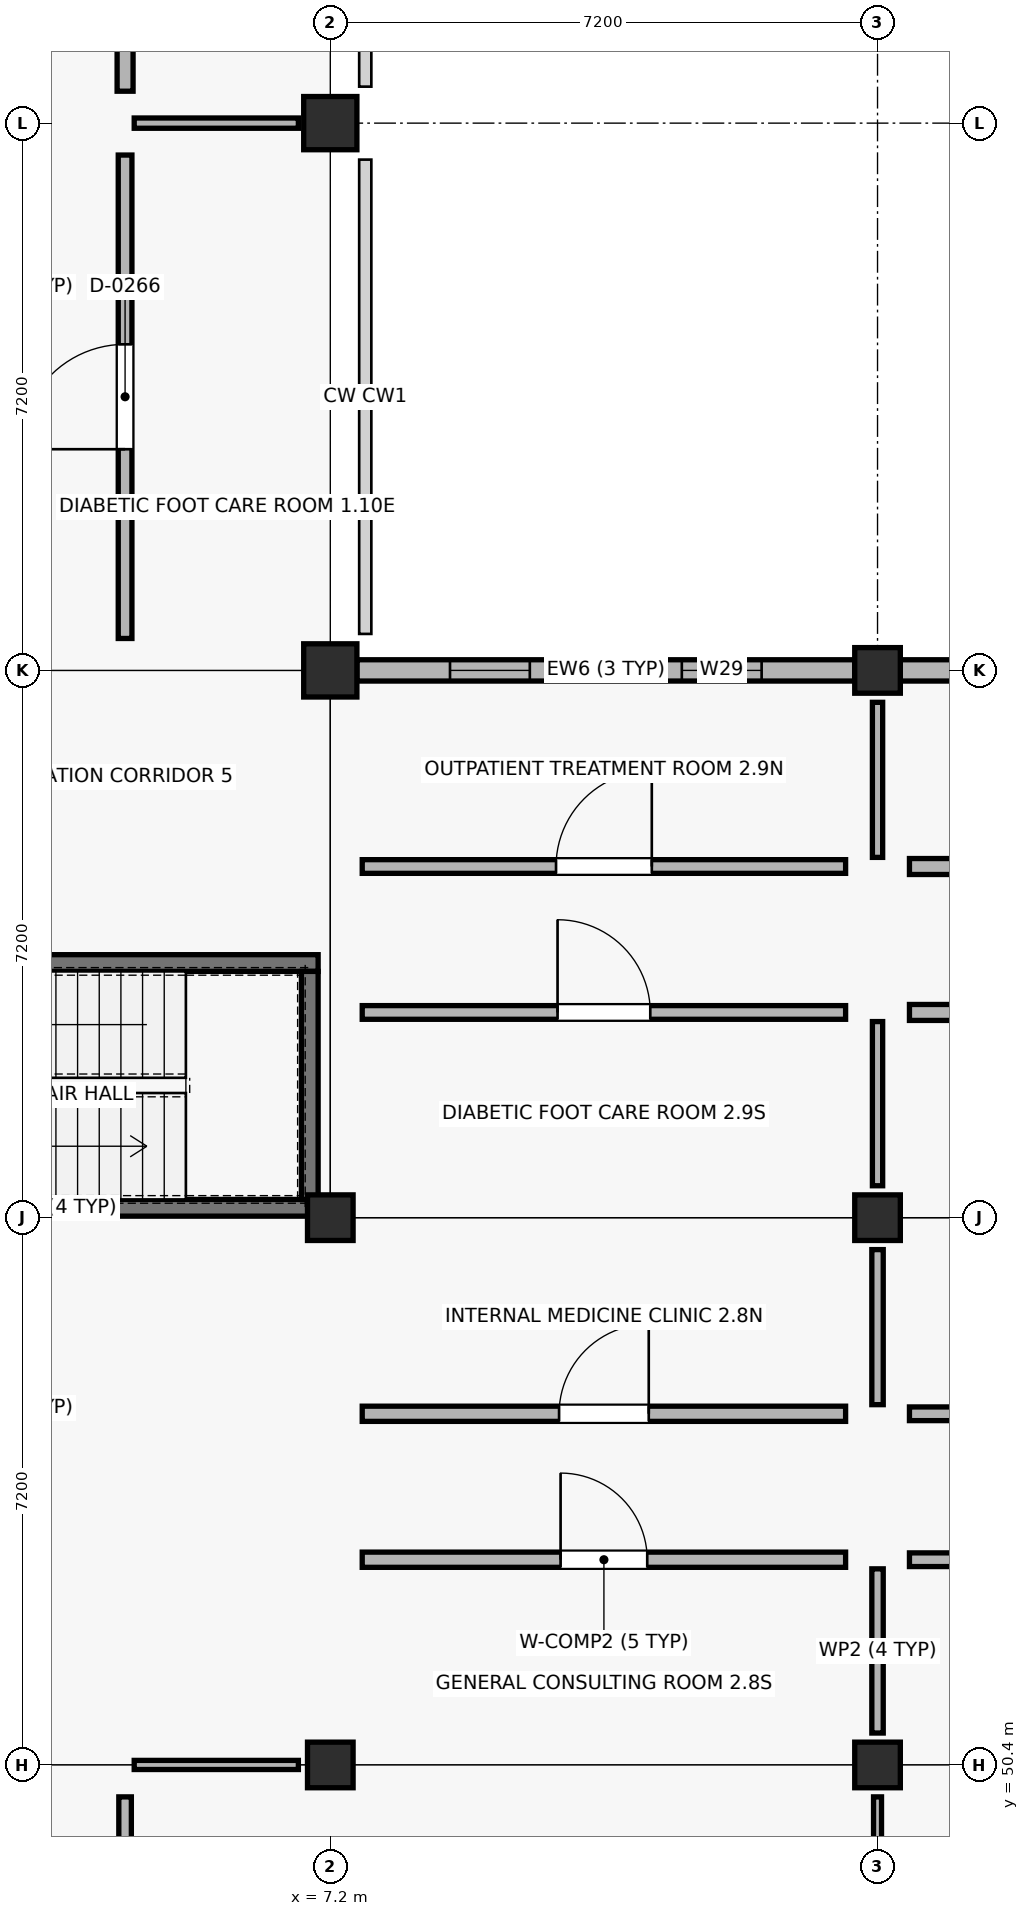
"""IFC4 building model, lengths in metres.
Left out: names, types, materials, properties, quantities, classifications, styles, units other than length and angle.
Written with IfcOpenShell. Run it as: python <this file> out.ifc"""

import sys

from ifc_helpers import new_model, si_unit, direction, frame, frame_2d, origin, origin_2d, place, context, subcontext, project, spatial, rectangle, extrude, element, fill, save


model = new_model("IFC4")
c1 = context("Model", 3, precision=1e-05, world=origin(), true_north=direction((0.0, 1.0)))
c2 = subcontext(c1, "Body", "Model", "MODEL_VIEW")
j1 = project(units=[si_unit("LENGTHUNIT", "METRE"), si_unit("PLANEANGLEUNIT", "RADIAN")], contexts=[c1])
p1 = place(None, origin())
s1 = spatial("IfcSite", under=j1, at=p1, CompositionType="ELEMENT")
p2 = place(p1, origin())
s2 = spatial("IfcBuilding", under=s1, at=p2, CompositionType="ELEMENT")
p3 = place(p2, frame((0.0, 0.0, 4.5)))
s3 = spatial("IfcBuildingStorey", under=s2, at=p3, CompositionType="ELEMENT", Elevation=4.5)
for number, where, z_axis, x_axis in (
    (1, (7.2, 50.4, 0.0), (0.0, 0.0, 1.0), (1.0, 0.0, 0.0)),
    (2, (7.2, 57.6, 0.0), (0.0, 0.0, 1.0), (1.0, 0.0, 0.0)),
):
    element("IfcColumn", number, at=place(p3, frame(where, z_axis=z_axis, x_axis=x_axis)), inside=s3, PredefinedType="COLUMN", context=c2, shape_type="SweptSolid", body=[
        extrude(rectangle(XDim=0.6, YDim=0.6, at=origin_2d()), origin(), (0.0, 0.0, 1.0), 4.5),
    ])
for number, where, z_axis, x_axis in (
    (3, (7.2, 64.8, 0.0), (0.0, 0.0, 1.0), (1.0, 0.0, 0.0)),
    (4, (7.2, 72.0, 0.0), (0.0, 0.0, 1.0), (1.0, 0.0, 0.0)),
):
    element("IfcColumn", number, at=place(p3, frame(where, z_axis=z_axis, x_axis=x_axis)), inside=s3, PredefinedType="COLUMN", context=c2, shape_type="SweptSolid", body=[
        extrude(rectangle(XDim=0.7, YDim=0.7, at=origin_2d()), origin(), (0.0, 0.0, 1.0), 4.5),
    ])
for number, where, z_axis, x_axis in (
    (5, (14.4, 50.4, 0.0), (0.0, 0.0, 1.0), (1.0, 0.0, 0.0)),
    (6, (14.4, 57.6, 0.0), (0.0, 0.0, 1.0), (1.0, 0.0, 0.0)),
    (7, (14.4, 64.8, 0.0), (0.0, 0.0, 1.0), (1.0, 0.0, 0.0)),
):
    element("IfcColumn", number, at=place(p3, frame(where, z_axis=z_axis, x_axis=x_axis)), inside=s3, PredefinedType="COLUMN", context=c2, shape_type="SweptSolid", body=[
        extrude(rectangle(XDim=0.6, YDim=0.6, at=origin_2d()), origin(), (0.0, 0.0, 1.0), 4.5),
    ])
p4 = place(p3, frame((14.1, 64.8, 0.0), z_axis=(0.0, 0.0, 1.0), x_axis=(-1.0, 0.0, 0.0)))
e8 = element("IfcWall", 8, at=p4, inside=s3, PredefinedType="STANDARD", context=c2, shape_type="SweptSolid", body=[
    extrude(rectangle(XDim=6.55, YDim=0.28, at=frame_2d((3.275, 0.0))), origin(), (0.0, 0.0, 1.0), 3.47),
])
p5 = place(p4, frame((1.225, 0.0, 0.9)))
e9 = element("IfcOpeningElement", 9, at=p5, cuts=e8, PredefinedType="OPENING", context=c2, shape_type="SweptSolid", body=[
    extrude(rectangle(XDim=1.05, YDim=1.62, at=frame_2d((0.525, 0.81))), frame((0.0, 0.15, 0.0), z_axis=(0.0, -1.0, 0.0), x_axis=(1.0, 0.0, 0.0)), (0.0, 0.0, 1.0), 0.3),
])
p6 = place(p4, frame((4.275, 0.0, 0.9)))
e10 = element("IfcOpeningElement", 10, at=p6, cuts=e8, PredefinedType="OPENING", context=c2, shape_type="SweptSolid", body=[
    extrude(rectangle(XDim=1.05, YDim=1.62, at=frame_2d((0.525, 0.81))), frame((0.0, 0.15, 0.0), z_axis=(0.0, -1.0, 0.0), x_axis=(1.0, 0.0, 0.0)), (0.0, 0.0, 1.0), 0.3),
])
p7 = place(p3, frame((21.275, 64.8, 0.0), z_axis=(0.0, 0.0, 1.0), x_axis=(-1.0, 0.0, 0.0)))
e11 = element("IfcWall", 11, at=p7, inside=s3, PredefinedType="STANDARD", context=c2, shape_type="SweptSolid", body=[
    extrude(rectangle(XDim=6.575, YDim=0.28, at=frame_2d((3.288, 0.0))), origin(), (0.0, 0.0, 1.0), 3.47),
])
p8 = place(p7, frame((1.075, 0.0, 0.9)))
e12 = element("IfcOpeningElement", 12, at=p8, cuts=e11, PredefinedType="OPENING", context=c2, shape_type="SweptSolid", body=[
    extrude(rectangle(XDim=1.35, YDim=1.75, at=frame_2d((0.675, 0.875))), frame((0.0, 0.15, 0.0), z_axis=(0.0, -1.0, 0.0), x_axis=(1.0, 0.0, 0.0)), (0.0, 0.0, 1.0), 0.3),
])
p9 = place(p7, frame((4.15, 0.0, 0.9)))
e13 = element("IfcOpeningElement", 13, at=p9, cuts=e11, PredefinedType="OPENING", context=c2, shape_type="SweptSolid", body=[
    extrude(rectangle(XDim=1.35, YDim=1.75, at=frame_2d((0.675, 0.875))), frame((0.0, 0.15, 0.0), z_axis=(0.0, -1.0, 0.0), x_axis=(1.0, 0.0, 0.0)), (0.0, 0.0, 1.0), 0.3),
])
p10 = place(p3, frame((0.16, 57.73, 0.0), z_axis=(0.0, 0.0, 1.0), x_axis=(1.0, 0.0, 0.0)))
e14 = element("IfcWall", 14, at=p10, inside=s3, PredefinedType="SHEAR", context=c2, shape_type="SweptSolid", body=[
    extrude(rectangle(XDim=6.88, YDim=0.22, at=frame_2d((3.44, 0.0))), origin(), (0.0, 0.0, 1.0), 4.22),
])
p11 = place(p3, frame((0.16, 60.95, 0.0), z_axis=(0.0, 0.0, 1.0), x_axis=(1.0, 0.0, 0.0)))
e15 = element("IfcWall", 15, at=p11, inside=s3, PredefinedType="SHEAR", context=c2, shape_type="SweptSolid", body=[
    extrude(rectangle(XDim=6.88, YDim=0.22, at=frame_2d((3.44, 0.0))), origin(), (0.0, 0.0, 1.0), 4.22),
])
p12 = place(p11, frame((0.35, 0.0, 0.0)))
e16 = element("IfcOpeningElement", 16, at=p12, cuts=e15, PredefinedType="OPENING", context=c2, shape_type="SweptSolid", body=[
    extrude(rectangle(XDim=1.2, YDim=2.15, at=frame_2d((0.6, 1.075))), frame((0.0, 0.12, 0.0), z_axis=(0.0, -1.0, 0.0), x_axis=(1.0, 0.0, 0.0)), (0.0, 0.0, 1.0), 0.24),
])
p13 = place(p3, frame((6.93, 57.84, 0.0), z_axis=(0.0, 0.0, 1.0), x_axis=(0.0, 1.0, 0.0)))
e17 = element("IfcWall", 17, at=p13, inside=s3, PredefinedType="SHEAR", context=c2, shape_type="SweptSolid", body=[
    extrude(rectangle(XDim=3.0, YDim=0.22, at=frame_2d((1.5, 0.0))), origin(), (0.0, 0.0, 1.0), 4.22),
])
p14 = place(p3, frame((4.5, 65.22, 0.0), z_axis=(0.0, 0.0, 1.0), x_axis=(0.0, 1.0, 0.0)))
e18 = element("IfcWall", 18, at=p14, inside=s3, PredefinedType="PARTITIONING", context=c2, shape_type="SweptSolid", body=[
    extrude(rectangle(XDim=6.36, YDim=0.18, at=frame_2d((3.18, 0.0))), origin(), (0.0, 0.0, 1.0), 3.36),
])
p15 = place(p14, frame((2.49, 0.0, 0.0)))
e19 = element("IfcOpeningElement", 19, at=p15, cuts=e18, PredefinedType="OPENING", context=c2, shape_type="SweptSolid", body=[
    extrude(rectangle(XDim=1.38, YDim=2.14, at=frame_2d((0.69, 1.07))), frame((0.0, 0.1, 0.0), z_axis=(0.0, -1.0, 0.0), x_axis=(1.0, 0.0, 0.0)), (0.0, 0.0, 1.0), 0.2),
])
p16 = place(p3, frame((4.62, 72.0, 0.0), z_axis=(0.0, 0.0, 1.0), x_axis=(1.0, 0.0, 0.0)))
e20 = element("IfcWall", 20, at=p16, inside=s3, PredefinedType="PARTITIONING", context=c2, shape_type="SweptSolid", body=[
    extrude(rectangle(XDim=2.16, YDim=0.135, at=frame_2d((1.08, 0.0))), origin(), (0.0, 0.0, 1.0), 3.36),
])
p17 = place(p3, frame((4.5, 72.42, 0.0), z_axis=(0.0, 0.0, 1.0), x_axis=(0.0, 1.0, 0.0)))
e21 = element("IfcWall", 21, at=p17, inside=s3, PredefinedType="PLUMBINGWALL", context=c2, shape_type="SweptSolid", body=[
    extrude(rectangle(XDim=6.36, YDim=0.21, at=frame_2d((3.18, 0.0))), origin(), (0.0, 0.0, 1.0), 3.36),
])
p18 = place(p17, frame((2.45, 0.0, 0.0)))
e22 = element("IfcOpeningElement", 22, at=p18, cuts=e21, PredefinedType="OPENING", context=c2, shape_type="SweptSolid", body=[
    extrude(rectangle(XDim=1.46, YDim=2.14, at=frame_2d((0.73, 1.07))), frame((0.0, 0.115, 0.0), z_axis=(0.0, -1.0, 0.0), x_axis=(1.0, 0.0, 0.0)), (0.0, 0.0, 1.0), 0.23),
])
p19 = place(p3, frame((7.62, 53.1, 0.0), z_axis=(0.0, 0.0, 1.0), x_axis=(1.0, 0.0, 0.0)))
e23 = element("IfcWall", 23, at=p19, inside=s3, PredefinedType="SOLIDWALL", context=c2, shape_type="SweptSolid", body=[
    extrude(rectangle(XDim=6.36, YDim=0.2, at=frame_2d((3.18, 0.0))), origin(), (0.0, 0.0, 1.0), 3.36),
])
p20 = place(p19, frame((2.61, 0.0, 0.0)))
e24 = element("IfcOpeningElement", 24, at=p20, cuts=e23, PredefinedType="OPENING", context=c2, shape_type="SweptSolid", body=[
    extrude(rectangle(XDim=1.14, YDim=2.19, at=frame_2d((0.57, 1.095))), frame((0.0, 0.11, 0.0), z_axis=(0.0, -1.0, 0.0), x_axis=(1.0, 0.0, 0.0)), (0.0, 0.0, 1.0), 0.22),
])
p21 = place(p3, frame((14.4, 50.82, 0.0), z_axis=(0.0, 0.0, 1.0), x_axis=(0.0, 1.0, 0.0)))
e25 = element("IfcWall", 25, at=p21, inside=s3, PredefinedType="PARTITIONING", context=c2, shape_type="SweptSolid", body=[
    extrude(rectangle(XDim=2.16, YDim=0.15, at=frame_2d((1.08, 0.0))), origin(), (0.0, 0.0, 1.0), 3.36),
])
p22 = place(p3, frame((7.62, 55.02, 0.0), z_axis=(0.0, 0.0, 1.0), x_axis=(1.0, 0.0, 0.0)))
e26 = element("IfcWall", 26, at=p22, inside=s3, PredefinedType="SOLIDWALL", context=c2, shape_type="SweptSolid", body=[
    extrude(rectangle(XDim=6.36, YDim=0.2, at=frame_2d((3.18, 0.0))), origin(), (0.0, 0.0, 1.0), 3.36),
])
p23 = place(p22, frame((2.59, 0.0, 0.0)))
e27 = element("IfcOpeningElement", 27, at=p23, cuts=e26, PredefinedType="OPENING", context=c2, shape_type="SweptSolid", body=[
    extrude(rectangle(XDim=1.18, YDim=2.19, at=frame_2d((0.59, 1.095))), frame((0.0, 0.11, 0.0), z_axis=(0.0, -1.0, 0.0), x_axis=(1.0, 0.0, 0.0)), (0.0, 0.0, 1.0), 0.22),
])
p24 = place(p3, frame((14.4, 55.14, 0.0), z_axis=(0.0, 0.0, 1.0), x_axis=(0.0, 1.0, 0.0)))
e28 = element("IfcWall", 28, at=p24, inside=s3, PredefinedType="PARTITIONING", context=c2, shape_type="SweptSolid", body=[
    extrude(rectangle(XDim=2.04, YDim=0.15, at=frame_2d((1.02, 0.0))), origin(), (0.0, 0.0, 1.0), 3.36),
])
p25 = place(p3, frame((7.62, 60.3, 0.0), z_axis=(0.0, 0.0, 1.0), x_axis=(1.0, 0.0, 0.0)))
e29 = element("IfcWall", 29, at=p25, inside=s3, PredefinedType="PARTITIONING", context=c2, shape_type="SweptSolid", body=[
    extrude(rectangle(XDim=6.36, YDim=0.18, at=frame_2d((3.18, 0.0))), origin(), (0.0, 0.0, 1.0), 3.36),
])
p26 = place(p25, frame((2.57, 0.0, 0.0)))
e30 = element("IfcOpeningElement", 30, at=p26, cuts=e29, PredefinedType="OPENING", context=c2, shape_type="SweptSolid", body=[
    extrude(rectangle(XDim=1.22, YDim=2.19, at=frame_2d((0.61, 1.095))), frame((0.0, 0.1, 0.0), z_axis=(0.0, -1.0, 0.0), x_axis=(1.0, 0.0, 0.0)), (0.0, 0.0, 1.0), 0.2),
])
p27 = place(p3, frame((14.4, 58.02, 0.0), z_axis=(0.0, 0.0, 1.0), x_axis=(0.0, 1.0, 0.0)))
e31 = element("IfcWall", 31, at=p27, inside=s3, PredefinedType="PARTITIONING", context=c2, shape_type="SweptSolid", body=[
    extrude(rectangle(XDim=2.16, YDim=0.135, at=frame_2d((1.08, 0.0))), origin(), (0.0, 0.0, 1.0), 3.36),
])
p28 = place(p3, frame((7.62, 62.22, 0.0), z_axis=(0.0, 0.0, 1.0), x_axis=(1.0, 0.0, 0.0)))
e32 = element("IfcWall", 32, at=p28, inside=s3, PredefinedType="PARTITIONING", context=c2, shape_type="SweptSolid", body=[
    extrude(rectangle(XDim=6.36, YDim=0.18, at=frame_2d((3.18, 0.0))), origin(), (0.0, 0.0, 1.0), 3.36),
])
p29 = place(p28, frame((2.55, 0.0, 0.0)))
e33 = element("IfcOpeningElement", 33, at=p29, cuts=e32, PredefinedType="OPENING", context=c2, shape_type="SweptSolid", body=[
    extrude(rectangle(XDim=1.26, YDim=2.19, at=frame_2d((0.63, 1.095))), frame((0.0, 0.1, 0.0), z_axis=(0.0, -1.0, 0.0), x_axis=(1.0, 0.0, 0.0)), (0.0, 0.0, 1.0), 0.2),
])
p30 = place(p3, frame((14.4, 62.34, 0.0), z_axis=(0.0, 0.0, 1.0), x_axis=(0.0, 1.0, 0.0)))
e34 = element("IfcWall", 34, at=p30, inside=s3, PredefinedType="PARTITIONING", context=c2, shape_type="SweptSolid", body=[
    extrude(rectangle(XDim=2.04, YDim=0.135, at=frame_2d((1.02, 0.0))), origin(), (0.0, 0.0, 1.0), 3.36),
])
p31 = place(p3, frame((14.82, 53.1, 0.0), z_axis=(0.0, 0.0, 1.0), x_axis=(1.0, 0.0, 0.0)))
e35 = element("IfcWall", 35, at=p31, inside=s3, PredefinedType="PARTITIONING", context=c2, shape_type="SweptSolid", body=[
    extrude(rectangle(XDim=6.36, YDim=0.18, at=frame_2d((3.18, 0.0))), origin(), (0.0, 0.0, 1.0), 3.36),
])
p32 = place(p31, frame((2.45, 0.0, 0.0)))
e36 = element("IfcOpeningElement", 36, at=p32, cuts=e35, PredefinedType="OPENING", context=c2, shape_type="SweptSolid", body=[
    extrude(rectangle(XDim=1.46, YDim=2.19, at=frame_2d((0.73, 1.095))), frame((0.0, 0.1, 0.0), z_axis=(0.0, -1.0, 0.0), x_axis=(1.0, 0.0, 0.0)), (0.0, 0.0, 1.0), 0.2),
])
p33 = place(p3, frame((14.82, 55.02, 0.0), z_axis=(0.0, 0.0, 1.0), x_axis=(1.0, 0.0, 0.0)))
e37 = element("IfcWall", 37, at=p33, inside=s3, PredefinedType="PARTITIONING", context=c2, shape_type="SweptSolid", body=[
    extrude(rectangle(XDim=6.36, YDim=0.18, at=frame_2d((3.18, 0.0))), origin(), (0.0, 0.0, 1.0), 3.36),
])
p34 = place(p33, frame((2.43, 0.0, 0.0)))
e38 = element("IfcOpeningElement", 38, at=p34, cuts=e37, PredefinedType="OPENING", context=c2, shape_type="SweptSolid", body=[
    extrude(rectangle(XDim=1.5, YDim=2.19, at=frame_2d((0.75, 1.095))), frame((0.0, 0.1, 0.0), z_axis=(0.0, -1.0, 0.0), x_axis=(1.0, 0.0, 0.0)), (0.0, 0.0, 1.0), 0.2),
])
p35 = place(p3, frame((14.82, 60.3, 0.0), z_axis=(0.0, 0.0, 1.0), x_axis=(1.0, 0.0, 0.0)))
e39 = element("IfcWall", 39, at=p35, inside=s3, PredefinedType="PLUMBINGWALL", context=c2, shape_type="SweptSolid", body=[
    extrude(rectangle(XDim=6.36, YDim=0.21, at=frame_2d((3.18, 0.0))), origin(), (0.0, 0.0, 1.0), 3.36),
])
p36 = place(p35, frame((2.555, 0.0, 0.0)))
e40 = element("IfcOpeningElement", 40, at=p36, cuts=e39, PredefinedType="OPENING", context=c2, shape_type="SweptSolid", body=[
    extrude(rectangle(XDim=1.25, YDim=2.15, at=frame_2d((0.625, 1.075))), frame((0.0, 0.115, 0.0), z_axis=(0.0, -1.0, 0.0), x_axis=(1.0, 0.0, 0.0)), (0.0, 0.0, 1.0), 0.23),
])
p37 = place(p3, frame((14.82, 62.22, 0.0), z_axis=(0.0, 0.0, 1.0), x_axis=(1.0, 0.0, 0.0)))
e41 = element("IfcWall", 41, at=p37, inside=s3, PredefinedType="PLUMBINGWALL", context=c2, shape_type="SweptSolid", body=[
    extrude(rectangle(XDim=6.36, YDim=0.21, at=frame_2d((3.18, 0.0))), origin(), (0.0, 0.0, 1.0), 3.36),
])
p38 = place(p37, frame((2.43, 0.0, 0.0)))
e42 = element("IfcOpeningElement", 42, at=p38, cuts=e41, PredefinedType="OPENING", context=c2, shape_type="SweptSolid", body=[
    extrude(rectangle(XDim=1.5, YDim=2.2, at=frame_2d((0.75, 1.1))), frame((0.0, 0.115, 0.0), z_axis=(0.0, -1.0, 0.0), x_axis=(1.0, 0.0, 0.0)), (0.0, 0.0, 1.0), 0.23),
])
p39 = place(p3, frame((4.5, 43.62, 0.0), z_axis=(0.0, 0.0, 1.0), x_axis=(0.0, 1.0, 0.0)))
e43 = element("IfcWall", 43, at=p39, inside=s3, PredefinedType="PARTITIONING", context=c2, shape_type="SweptSolid", body=[
    extrude(rectangle(XDim=6.36, YDim=0.165, at=frame_2d((3.18, 0.0))), origin(), (0.0, 0.0, 1.0), 3.36),
])
p40 = place(p39, frame((2.49, 0.0, 0.0)))
e44 = element("IfcOpeningElement", 44, at=p40, cuts=e43, PredefinedType="OPENING", context=c2, shape_type="SweptSolid", body=[
    extrude(rectangle(XDim=1.38, YDim=2.04, at=frame_2d((0.69, 1.02))), frame((0.0, 0.093, 0.0), z_axis=(0.0, -1.0, 0.0), x_axis=(1.0, 0.0, 0.0)), (0.0, 0.0, 1.0), 0.185),
])
p41 = place(p3, frame((4.62, 50.4, 0.0), z_axis=(0.0, 0.0, 1.0), x_axis=(1.0, 0.0, 0.0)))
e45 = element("IfcWall", 45, at=p41, inside=s3, PredefinedType="PARTITIONING", context=c2, shape_type="SweptSolid", body=[
    extrude(rectangle(XDim=2.16, YDim=0.12, at=frame_2d((1.08, 0.0))), origin(), (0.0, 0.0, 1.0), 3.36),
])
p42 = place(p3, frame((14.4, 47.94, 0.0), z_axis=(0.0, 0.0, 1.0), x_axis=(0.0, 1.0, 0.0)))
e46 = element("IfcWall", 46, at=p42, inside=s3, PredefinedType="PARTITIONING", context=c2, shape_type="SweptSolid", body=[
    extrude(rectangle(XDim=2.04, YDim=0.105, at=frame_2d((1.02, 0.0))), origin(), (0.0, 0.0, 1.0), 3.36),
])
p43 = place(p5, origin())
e47 = element("IfcWindow", 47, at=p43, inside=s3, PartitioningType="SINGLE_PANEL", PredefinedType="WINDOW", context=c2, shape_type="SweptSolid", body=[
    extrude(rectangle(XDim=1.05, YDim=1.62, at=frame_2d((0.525, 0.81))), frame((0.0, 0.03, 0.0), z_axis=(0.0, -1.0, 0.0), x_axis=(1.0, 0.0, 0.0)), (0.0, 0.0, 1.0), 0.06),
])
fill(e9, e47)
p44 = place(p6, origin())
e48 = element("IfcWindow", 48, at=p44, inside=s3, PartitioningType="SINGLE_PANEL", PredefinedType="WINDOW", context=c2, shape_type="SweptSolid", body=[
    extrude(rectangle(XDim=1.05, YDim=1.62, at=frame_2d((0.525, 0.81))), frame((0.0, 0.03, 0.0), z_axis=(0.0, -1.0, 0.0), x_axis=(1.0, 0.0, 0.0)), (0.0, 0.0, 1.0), 0.06),
])
fill(e10, e48)
p45 = place(p15, origin())
e49 = element("IfcDoor", 49, at=p45, inside=s3, OperationType="SINGLE_SWING_LEFT", PredefinedType="DOOR", context=c2, shape_type="SweptSolid", body=[
    extrude(rectangle(XDim=1.38, YDim=2.14, at=frame_2d((0.69, 1.07))), frame((0.0, 0.025, 0.0), z_axis=(0.0, -1.0, 0.0), x_axis=(1.0, 0.0, 0.0)), (0.0, 0.0, 1.0), 0.05),
])
fill(e19, e49)
p46 = place(p20, origin())
e50 = element("IfcDoor", 50, at=p46, inside=s3, OperationType="SINGLE_SWING_LEFT", PredefinedType="DOOR", context=c2, shape_type="SweptSolid", body=[
    extrude(rectangle(XDim=1.14, YDim=2.19, at=frame_2d((0.57, 1.095))), frame((0.0, 0.025, 0.0), z_axis=(0.0, -1.0, 0.0), x_axis=(1.0, 0.0, 0.0)), (0.0, 0.0, 1.0), 0.05),
])
fill(e24, e50)
p47 = place(p23, origin())
e51 = element("IfcDoor", 51, at=p47, inside=s3, OperationType="SINGLE_SWING_RIGHT", PredefinedType="DOOR", context=c2, shape_type="SweptSolid", body=[
    extrude(rectangle(XDim=1.18, YDim=2.19, at=frame_2d((0.59, 1.095))), frame((0.0, 0.025, 0.0), z_axis=(0.0, -1.0, 0.0), x_axis=(1.0, 0.0, 0.0)), (0.0, 0.0, 1.0), 0.05),
])
fill(e27, e51)
p48 = place(p26, origin())
e52 = element("IfcDoor", 52, at=p48, inside=s3, OperationType="SINGLE_SWING_LEFT", PredefinedType="DOOR", context=c2, shape_type="SweptSolid", body=[
    extrude(rectangle(XDim=1.22, YDim=2.19, at=frame_2d((0.61, 1.095))), frame((0.0, 0.025, 0.0), z_axis=(0.0, -1.0, 0.0), x_axis=(1.0, 0.0, 0.0)), (0.0, 0.0, 1.0), 0.05),
])
fill(e30, e52)
p49 = place(p29, origin())
e53 = element("IfcDoor", 53, at=p49, inside=s3, OperationType="SINGLE_SWING_RIGHT", PredefinedType="DOOR", context=c2, shape_type="SweptSolid", body=[
    extrude(rectangle(XDim=1.26, YDim=2.19, at=frame_2d((0.63, 1.095))), frame((0.0, 0.025, 0.0), z_axis=(0.0, -1.0, 0.0), x_axis=(1.0, 0.0, 0.0)), (0.0, 0.0, 1.0), 0.05),
])
fill(e33, e53)
save(model, sys.argv[1])
